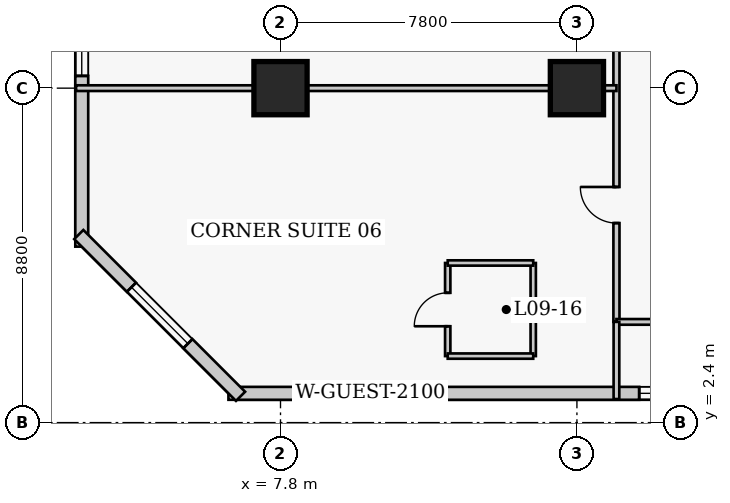
"""IFC4 building model, lengths in metres.
Left out: names, types, materials, properties, quantities, classifications, styles, units other than length and angle.
Written with IfcOpenShell. Run it as: python <this file> out.ifc"""

import sys

from ifc_helpers import new_model, si_unit, direction, frame, frame_2d, origin, origin_2d, place, context, subcontext, project, spatial, rectangle, extrude, element, fill, save


model = new_model("IFC4")
c1 = context("Model", 3, precision=1e-05, world=origin(), true_north=direction((0.0, 1.0)))
c2 = subcontext(c1, "Body", "Model", "MODEL_VIEW")
j1 = project(units=[si_unit("LENGTHUNIT", "METRE"), si_unit("PLANEANGLEUNIT", "RADIAN")], contexts=[c1])
p1 = place(None, origin())
s1 = spatial("IfcSite", under=j1, at=p1, CompositionType="ELEMENT")
p2 = place(p1, origin())
s2 = spatial("IfcBuilding", under=s1, at=p2, CompositionType="ELEMENT")
p3 = place(p2, frame((0.0, 0.0, 41.2)))
s3 = spatial("IfcBuildingStorey", under=s2, at=p3, CompositionType="ELEMENT", Elevation=41.2)
for number, where, z_axis, x_axis in (
    (1, (7.8, 11.2, 0.0), (0.0, 0.0, 1.0), (1.0, 0.0, 0.0)),
    (2, (15.6, 11.2, 0.0), (0.0, 0.0, 1.0), (1.0, 0.0, 0.0)),
):
    element("IfcColumn", number, at=place(p3, frame(where, z_axis=z_axis, x_axis=x_axis)), inside=s3, PredefinedType="COLUMN", context=c2, shape_type="SweptSolid", body=[
        extrude(rectangle(XDim=1.4, YDim=1.4, at=origin_2d()), origin(), (0.0, 0.0, 1.0), 3.8),
    ])
p4 = place(p3, frame((6.43, 3.17, 0.0), z_axis=(0.0, 0.0, 1.0), x_axis=(1.0, 0.0, 0.0)))
e3 = element("IfcWall", 3, at=p4, inside=s3, PredefinedType="SOLIDWALL", context=c2, shape_type="SweptSolid", body=[
    extrude(rectangle(XDim=29.89, YDim=0.34, at=frame_2d((14.945, 0.0))), origin(), (0.0, 0.0, 1.0), 3.54),
])
p5 = place(p4, frame((20.17, 0.0, 0.0)))
e4 = element("IfcOpeningElement", 4, at=p5, cuts=e3, PredefinedType="OPENING", context=c2, shape_type="SweptSolid", body=[
    extrude(rectangle(XDim=1.4, YDim=2.15, at=frame_2d((0.7, 1.075))), frame((0.0, 0.18, 0.0), z_axis=(0.0, -1.0, 0.0), x_axis=(1.0, 0.0, 0.0)), (0.0, 0.0, 1.0), 0.36),
])
p6 = place(p4, frame((2.686, 0.0, 0.85)))
e5 = element("IfcOpeningElement", 5, at=p6, cuts=e3, PredefinedType="OPENING", context=c2, shape_type="SweptSolid", body=[
    extrude(rectangle(XDim=2.1, YDim=1.85, at=frame_2d((1.05, 0.925))), frame((0.0, 0.18, 0.0), z_axis=(0.0, -1.0, 0.0), x_axis=(1.0, 0.0, 0.0)), (0.0, 0.0, 1.0), 0.36),
])
p7 = place(p4, frame((10.809, 0.0, 0.85)))
e6 = element("IfcOpeningElement", 6, at=p7, cuts=e3, PredefinedType="OPENING", context=c2, shape_type="SweptSolid", body=[
    extrude(rectangle(XDim=2.1, YDim=1.85, at=frame_2d((1.05, 0.925))), frame((0.0, 0.18, 0.0), z_axis=(0.0, -1.0, 0.0), x_axis=(1.0, 0.0, 0.0)), (0.0, 0.0, 1.0), 0.36),
])
p8 = place(p4, frame((25.104, 0.0, 0.85)))
e7 = element("IfcOpeningElement", 7, at=p8, cuts=e3, PredefinedType="OPENING", context=c2, shape_type="SweptSolid", body=[
    extrude(rectangle(XDim=2.1, YDim=1.85, at=frame_2d((1.05, 0.925))), frame((0.0, 0.18, 0.0), z_axis=(0.0, -1.0, 0.0), x_axis=(1.0, 0.0, 0.0)), (0.0, 0.0, 1.0), 0.36),
])
p9 = place(p3, frame((2.57, 42.17, 0.0), z_axis=(0.0, 0.0, 1.0), x_axis=(0.0, -1.0, 0.0)))
e8 = element("IfcWall", 8, at=p9, inside=s3, PredefinedType="SOLIDWALL", context=c2, shape_type="SweptSolid", body=[
    extrude(rectangle(XDim=35.14, YDim=0.34, at=frame_2d((17.57, 0.0))), origin(), (0.0, 0.0, 1.0), 3.54),
])
p10 = place(p9, frame((3.343, 0.0, 0.85)))
e9 = element("IfcOpeningElement", 9, at=p10, cuts=e8, PredefinedType="OPENING", context=c2, shape_type="SweptSolid", body=[
    extrude(rectangle(XDim=2.1, YDim=1.85, at=frame_2d((1.05, 0.925))), frame((0.0, 0.18, 0.0), z_axis=(0.0, -1.0, 0.0), x_axis=(1.0, 0.0, 0.0)), (0.0, 0.0, 1.0), 0.36),
])
p11 = place(p9, frame((10.978, 0.0, 0.85)))
e10 = element("IfcOpeningElement", 10, at=p11, cuts=e8, PredefinedType="OPENING", context=c2, shape_type="SweptSolid", body=[
    extrude(rectangle(XDim=2.1, YDim=1.85, at=frame_2d((1.05, 0.925))), frame((0.0, 0.18, 0.0), z_axis=(0.0, -1.0, 0.0), x_axis=(1.0, 0.0, 0.0)), (0.0, 0.0, 1.0), 0.36),
])
p12 = place(p9, frame((19.762, 0.0, 0.85)))
e11 = element("IfcOpeningElement", 11, at=p12, cuts=e8, PredefinedType="OPENING", context=c2, shape_type="SweptSolid", body=[
    extrude(rectangle(XDim=2.1, YDim=1.85, at=frame_2d((1.05, 0.925))), frame((0.0, 0.18, 0.0), z_axis=(0.0, -1.0, 0.0), x_axis=(1.0, 0.0, 0.0)), (0.0, 0.0, 1.0), 0.36),
])
p13 = place(p9, frame((28.548, 0.0, 0.85)))
e12 = element("IfcOpeningElement", 12, at=p13, cuts=e8, PredefinedType="OPENING", context=c2, shape_type="SweptSolid", body=[
    extrude(rectangle(XDim=2.1, YDim=1.85, at=frame_2d((1.05, 0.925))), frame((0.0, 0.18, 0.0), z_axis=(0.0, -1.0, 0.0), x_axis=(1.0, 0.0, 0.0)), (0.0, 0.0, 1.0), 0.36),
])
p14 = place(p3, frame((2.492, 7.348, 0.0), z_axis=(0.0, 0.0, 1.0), x_axis=(0.707106781187, -0.707106781187, 0.0)))
e13 = element("IfcWall", 13, at=p14, inside=s3, PredefinedType="SOLIDWALL", context=c2, shape_type="SweptSolid", body=[
    extrude(rectangle(XDim=6.02, YDim=0.34, at=frame_2d((3.01, 0.0))), origin(), (0.0, 0.0, 1.0), 3.54),
])
p15 = place(p14, frame((1.96, 0.0, 0.85)))
e14 = element("IfcOpeningElement", 14, at=p15, cuts=e13, PredefinedType="OPENING", context=c2, shape_type="SweptSolid", body=[
    extrude(rectangle(XDim=2.1, YDim=1.85, at=frame_2d((1.05, 0.925))), frame((0.0, 0.18, 0.0), z_axis=(0.0, -1.0, 0.0), x_axis=(1.0, 0.0, 0.0)), (0.0, 0.0, 1.0), 0.36),
])
p16 = place(p3, frame((16.64, 5.05, 0.0), z_axis=(0.0, 0.0, 1.0), x_axis=(0.0, 1.0, 0.0)))
e15 = element("IfcWall", 15, at=p16, inside=s3, PredefinedType="PARTITIONING", context=c2, shape_type="SweptSolid", body=[
    extrude(rectangle(XDim=35.6, YDim=0.16, at=frame_2d((17.8, 0.0))), origin(), (0.0, 0.0, 1.0), 3.54),
])
p17 = place(p16, frame((2.6, 0.0, 0.0)))
e16 = element("IfcOpeningElement", 16, at=p17, cuts=e15, PredefinedType="OPENING", context=c2, shape_type="SweptSolid", body=[
    extrude(rectangle(XDim=0.95, YDim=2.1, at=frame_2d((0.475, 1.05))), frame((0.0, 0.09, 0.0), z_axis=(0.0, -1.0, 0.0), x_axis=(1.0, 0.0, 0.0)), (0.0, 0.0, 1.0), 0.18),
])
p18 = place(p16, frame((10.075, 0.0, 0.0)))
e17 = element("IfcOpeningElement", 17, at=p18, cuts=e15, PredefinedType="OPENING", context=c2, shape_type="SweptSolid", body=[
    extrude(rectangle(XDim=0.95, YDim=2.1, at=frame_2d((0.475, 1.05))), frame((0.0, 0.09, 0.0), z_axis=(0.0, -1.0, 0.0), x_axis=(1.0, 0.0, 0.0)), (0.0, 0.0, 1.0), 0.18),
])
p19 = place(p16, frame((18.875, 0.0, 0.0)))
e18 = element("IfcOpeningElement", 18, at=p19, cuts=e15, PredefinedType="OPENING", context=c2, shape_type="SweptSolid", body=[
    extrude(rectangle(XDim=0.95, YDim=2.1, at=frame_2d((0.475, 1.05))), frame((0.0, 0.09, 0.0), z_axis=(0.0, -1.0, 0.0), x_axis=(1.0, 0.0, 0.0)), (0.0, 0.0, 1.0), 0.18),
])
p20 = place(p16, frame((26.575, 0.0, 0.0)))
e19 = element("IfcOpeningElement", 19, at=p20, cuts=e15, PredefinedType="OPENING", context=c2, shape_type="SweptSolid", body=[
    extrude(rectangle(XDim=0.95, YDim=2.1, at=frame_2d((0.475, 1.05))), frame((0.0, 0.09, 0.0), z_axis=(0.0, -1.0, 0.0), x_axis=(1.0, 0.0, 0.0)), (0.0, 0.0, 1.0), 0.18),
])
p21 = place(p16, frame((30.9, 0.0, 0.0)))
e20 = element("IfcOpeningElement", 20, at=p21, cuts=e15, PredefinedType="OPENING", context=c2, shape_type="SweptSolid", body=[
    extrude(rectangle(XDim=1.0, YDim=2.15, at=frame_2d((0.5, 1.075))), frame((0.0, 0.09, 0.0), z_axis=(0.0, -1.0, 0.0), x_axis=(1.0, 0.0, 0.0)), (0.0, 0.0, 1.0), 0.18),
])
p22 = place(p3, frame((16.64, 5.05, 0.0), z_axis=(0.0, 0.0, 1.0), x_axis=(1.0, 0.0, 0.0)))
e21 = element("IfcWall", 21, at=p22, inside=s3, PredefinedType="PARTITIONING", context=c2, shape_type="SweptSolid", body=[
    extrude(rectangle(XDim=2.22, YDim=0.15, at=frame_2d((1.11, 0.0))), origin(), (0.0, 0.0, 1.0), 3.54),
])
p23 = place(p3, frame((16.64, 3.02, 0.0), z_axis=(0.0, 0.0, 1.0), x_axis=(0.0, 1.0, 0.0)))
e22 = element("IfcWall", 22, at=p23, inside=s3, PredefinedType="PARTITIONING", context=c2, shape_type="SweptSolid", body=[
    extrude(rectangle(XDim=2.03, YDim=0.15, at=frame_2d((1.015, 0.0))), origin(), (0.0, 0.0, 1.0), 3.54),
])
p24 = place(p3, frame((12.2, 4.15, 0.0), z_axis=(0.0, 0.0, 1.0), x_axis=(0.0, 1.0, 0.0)))
e23 = element("IfcWall", 23, at=p24, inside=s3, PredefinedType="PLUMBINGWALL", context=c2, shape_type="SweptSolid", body=[
    extrude(rectangle(XDim=2.45, YDim=0.14, at=frame_2d((1.225, 0.0))), origin(), (0.0, 0.0, 1.0), 3.54),
])
p25 = place(p24, frame((0.785, 0.0, 0.0)))
e24 = element("IfcOpeningElement", 24, at=p25, cuts=e23, PredefinedType="OPENING", context=c2, shape_type="SweptSolid", body=[
    extrude(rectangle(XDim=0.88, YDim=2.05, at=frame_2d((0.44, 1.025))), frame((0.0, 0.08, 0.0), z_axis=(0.0, -1.0, 0.0), x_axis=(1.0, 0.0, 0.0)), (0.0, 0.0, 1.0), 0.16),
])
p26 = place(p3, frame((14.45, 4.15, 0.0), z_axis=(0.0, 0.0, 1.0), x_axis=(0.0, 1.0, 0.0)))
e25 = element("IfcWall", 25, at=p26, inside=s3, PredefinedType="PLUMBINGWALL", context=c2, shape_type="SweptSolid", body=[
    extrude(rectangle(XDim=2.45, YDim=0.14, at=frame_2d((1.225, 0.0))), origin(), (0.0, 0.0, 1.0), 3.54),
])
for number, where, z_axis, x_axis in (
    (26, (12.2, 4.15, 0.0), (0.0, 0.0, 1.0), (1.0, 0.0, 0.0)),
    (27, (12.2, 6.6, 0.0), (0.0, 0.0, 1.0), (1.0, 0.0, 0.0)),
):
    element("IfcWall", number, at=place(p3, frame(where, z_axis=z_axis, x_axis=x_axis)), inside=s3, PredefinedType="PLUMBINGWALL", context=c2, shape_type="SweptSolid", body=[
        extrude(rectangle(XDim=2.25, YDim=0.14, at=frame_2d((1.125, 0.0))), origin(), (0.0, 0.0, 1.0), 3.54),
    ])
p27 = place(p3, frame((2.42, 11.2, 0.0), z_axis=(0.0, 0.0, 1.0), x_axis=(1.0, 0.0, 0.0)))
e28 = element("IfcWall", 28, at=p27, inside=s3, PredefinedType="PARTITIONING", context=c2, shape_type="SweptSolid", body=[
    extrude(rectangle(XDim=14.22, YDim=0.15, at=frame_2d((7.11, 0.0))), origin(), (0.0, 0.0, 1.0), 2.593),
])
p28 = place(p6, origin())
e29 = element("IfcWindow", 29, at=p28, inside=s3, PartitioningType="SINGLE_PANEL", PredefinedType="WINDOW", context=c2, shape_type="SweptSolid", body=[
    extrude(rectangle(XDim=2.1, YDim=1.85, at=frame_2d((1.05, 0.925))), frame((0.0, 0.03, 0.0), z_axis=(0.0, -1.0, 0.0), x_axis=(1.0, 0.0, 0.0)), (0.0, 0.0, 1.0), 0.06),
])
fill(e5, e29)
p29 = place(p7, origin())
e30 = element("IfcWindow", 30, at=p29, inside=s3, PartitioningType="SINGLE_PANEL", PredefinedType="WINDOW", context=c2, shape_type="SweptSolid", body=[
    extrude(rectangle(XDim=2.1, YDim=1.85, at=frame_2d((1.05, 0.925))), frame((0.0, 0.03, 0.0), z_axis=(0.0, -1.0, 0.0), x_axis=(1.0, 0.0, 0.0)), (0.0, 0.0, 1.0), 0.06),
])
fill(e6, e30)
p30 = place(p13, origin())
e31 = element("IfcWindow", 31, at=p30, inside=s3, PartitioningType="SINGLE_PANEL", PredefinedType="WINDOW", context=c2, shape_type="SweptSolid", body=[
    extrude(rectangle(XDim=2.1, YDim=1.85, at=frame_2d((1.05, 0.925))), frame((0.0, 0.03, 0.0), z_axis=(0.0, -1.0, 0.0), x_axis=(1.0, 0.0, 0.0)), (0.0, 0.0, 1.0), 0.06),
])
fill(e12, e31)
p31 = place(p15, origin())
e32 = element("IfcWindow", 32, at=p31, inside=s3, PartitioningType="SINGLE_PANEL", PredefinedType="WINDOW", context=c2, shape_type="SweptSolid", body=[
    extrude(rectangle(XDim=2.1, YDim=1.85, at=frame_2d((1.05, 0.925))), frame((0.0, 0.03, 0.0), z_axis=(0.0, -1.0, 0.0), x_axis=(1.0, 0.0, 0.0)), (0.0, 0.0, 1.0), 0.06),
])
fill(e14, e32)
p32 = place(p25, origin())
e33 = element("IfcDoor", 33, at=p32, inside=s3, OperationType="SINGLE_SWING_LEFT", PredefinedType="DOOR", context=c2, shape_type="SweptSolid", body=[
    extrude(rectangle(XDim=0.88, YDim=2.05, at=frame_2d((0.44, 1.025))), frame((0.0, 0.025, 0.0), z_axis=(0.0, -1.0, 0.0), x_axis=(1.0, 0.0, 0.0)), (0.0, 0.0, 1.0), 0.05),
])
fill(e24, e33)
p33 = place(p17, origin())
e34 = element("IfcDoor", 34, at=p33, inside=s3, OperationType="SINGLE_SWING_RIGHT", PredefinedType="DOOR", context=c2, shape_type="SweptSolid", body=[
    extrude(rectangle(XDim=0.95, YDim=2.1, at=frame_2d((0.475, 1.05))), frame((0.0, 0.025, 0.0), z_axis=(0.0, -1.0, 0.0), x_axis=(1.0, 0.0, 0.0)), (0.0, 0.0, 1.0), 0.05),
])
fill(e16, e34)
save(model, sys.argv[1])
